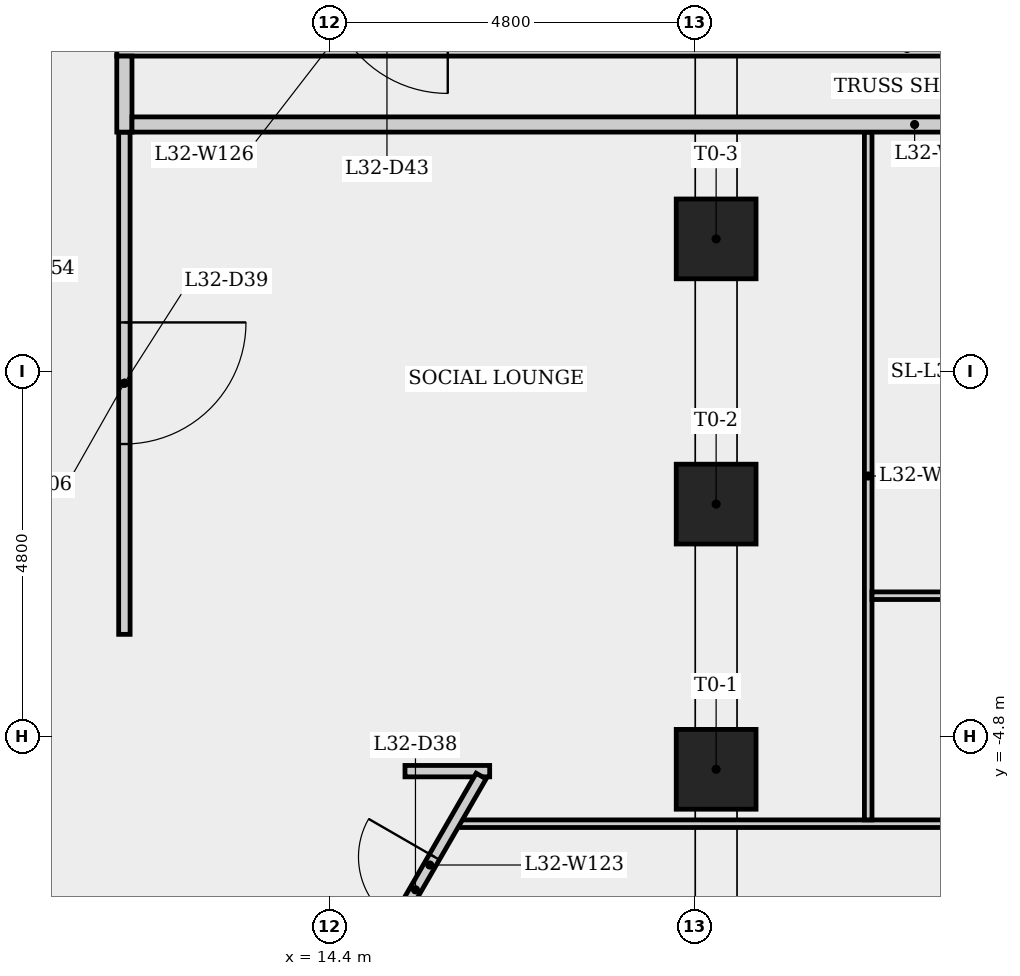
"""IFC4 building model, lengths in metres.
Left out: names, types, materials, properties, quantities, classifications, styles, units other than length and angle.
Written with IfcOpenShell. Run it as: python <this file> out.ifc"""

import sys

from ifc_helpers import new_model, si_unit, direction, frame, frame_2d, origin, origin_2d, place, context, subcontext, project, spatial, rectangle, extrude, element, fill, save


model = new_model("IFC4")
c1 = context("Model", 3, precision=1e-05, world=origin(), true_north=direction((0.0, 1.0)))
c2 = subcontext(c1, "Body", "Model", "MODEL_VIEW")
j1 = project(units=[si_unit("LENGTHUNIT", "METRE"), si_unit("PLANEANGLEUNIT", "RADIAN")], contexts=[c1])
p1 = place(None, origin())
s1 = spatial("IfcSite", under=j1, at=p1, CompositionType="ELEMENT")
p2 = place(p1, origin())
s2 = spatial("IfcBuilding", under=s1, at=p2, CompositionType="ELEMENT")
p3 = place(p2, frame((0.0, 0.0, 120.5)))
s3 = spatial("IfcBuildingStorey", under=s2, at=p3, CompositionType="ELEMENT", Elevation=120.5)
for number, where, z_axis, x_axis in (
    (1, (19.486, -5.234, 0.0), (0.0, 0.0, 1.0), (1.0, 0.0, 0.0)),
    (2, (19.486, -1.745, 0.0), (0.0, 0.0, 1.0), (1.0, 0.0, 0.0)),
    (3, (19.486, 1.745, 0.0), (0.0, 0.0, 1.0), (1.0, 0.0, 0.0)),
):
    element("IfcColumn", number, at=place(p3, frame(where, z_axis=z_axis, x_axis=x_axis)), inside=s3, PredefinedType="COLUMN", context=c2, shape_type="SweptSolid", body=[
        extrude(rectangle(XDim=1.05, YDim=1.05, at=origin_2d()), origin(), (0.0, 0.0, 1.0), 4.0),
    ])
p4 = place(p3, frame((11.7, 3.15, 0.0), z_axis=(0.0, 0.0, 1.0), x_axis=(0.0, -1.0, 0.0)))
e4 = element("IfcWall", 4, at=p4, inside=s3, PredefinedType="PARTITIONING", context=c2, shape_type="SweptSolid", body=[
    extrude(rectangle(XDim=6.609, YDim=0.15, at=frame_2d((3.304, 0.0))), origin(), (0.0, 0.0, 1.0), 3.6),
])
p5 = place(p4, frame((2.504, 0.0, 0.0)))
e5 = element("IfcOpeningElement", 5, at=p5, cuts=e4, PredefinedType="OPENING", context=c2, shape_type="SweptSolid", body=[
    extrude(rectangle(XDim=1.6, YDim=2.1, at=frame_2d((0.8, 1.05))), frame((0.0, 0.085, 0.0), z_axis=(0.0, -1.0, 0.0), x_axis=(1.0, 0.0, 0.0)), (0.0, 0.0, 1.0), 0.17),
])
p6 = place(p3, frame((11.6, 4.25, 0.0), z_axis=(0.0, 0.0, 1.0), x_axis=(1.0, 0.0, 0.0)))
e6 = element("IfcWall", 6, at=p6, inside=s3, PredefinedType="PLUMBINGWALL", context=c2, shape_type="SweptSolid", body=[
    extrude(rectangle(XDim=20.794, YDim=0.2, at=frame_2d((10.397, 0.0))), origin(), (0.0, 0.0, 1.0), 3.6),
])
p7 = place(p3, frame((11.7, 4.15, 0.0), z_axis=(0.0, 0.0, 1.0), x_axis=(0.0, -1.0, 0.0)))
e7 = element("IfcWall", 7, at=p7, inside=s3, PredefinedType="PLUMBINGWALL", context=c2, shape_type="SweptSolid", body=[
    extrude(rectangle(XDim=1.0, YDim=0.2, at=frame_2d((0.5, 0.0))), origin(), (0.0, 0.0, 1.0), 3.6),
])
p8 = place(p3, frame((15.392, -5.259, 0.0), z_axis=(0.0, 0.0, 1.0), x_axis=(1.0, 0.0, 0.0)))
e8 = element("IfcWall", 8, at=p8, inside=s3, PredefinedType="PARTITIONING", context=c2, shape_type="SweptSolid", body=[
    extrude(rectangle(XDim=1.114, YDim=0.15, at=frame_2d((0.557, 0.0))), origin(), (0.0, 0.0, 1.0), 3.6),
])
p9 = place(p3, frame((16.107, -5.95, 0.0), z_axis=(0.0, 0.0, 1.0), x_axis=(1.0, 0.0, 0.0)))
e9 = element("IfcWall", 9, at=p9, inside=s3, PredefinedType="PARTITIONING", context=c2, shape_type="SweptSolid", body=[
    extrude(rectangle(XDim=16.137, YDim=0.1, at=frame_2d((8.069, 0.0))), origin(), (0.0, 0.0, 1.0), 3.6),
])
p10 = place(p9, frame((6.529, 0.0, 0.0)))
e10 = element("IfcOpeningElement", 10, at=p10, cuts=e9, PredefinedType="OPENING", context=c2, shape_type="SweptSolid", body=[
    extrude(rectangle(XDim=0.9, YDim=2.1, at=frame_2d((0.45, 1.05))), frame((0.0, 0.06, 0.0), z_axis=(0.0, -1.0, 0.0), x_axis=(1.0, 0.0, 0.0)), (0.0, 0.0, 1.0), 0.12),
])
p11 = place(p9, frame((9.829, 0.0, 0.0)))
e11 = element("IfcOpeningElement", 11, at=p11, cuts=e9, PredefinedType="OPENING", context=c2, shape_type="SweptSolid", body=[
    extrude(rectangle(XDim=0.9, YDim=2.1, at=frame_2d((0.45, 1.05))), frame((0.0, 0.06, 0.0), z_axis=(0.0, -1.0, 0.0), x_axis=(1.0, 0.0, 0.0)), (0.0, 0.0, 1.0), 0.12),
])
p12 = place(p3, frame((15.042, -7.664, 0.0), z_axis=(0.0, 0.0, 1.0), x_axis=(0.500006618465, 0.866021582578, 0.0)))
e12 = element("IfcWall", 12, at=p12, inside=s3, PredefinedType="PARTITIONING", context=c2, shape_type="SweptSolid", body=[
    extrude(rectangle(XDim=2.702, YDim=0.15, at=frame_2d((1.351, 0.0))), origin(), (0.0, 0.0, 1.0), 3.6),
])
p13 = place(p12, frame((0.474, 0.0, 0.0)))
e13 = element("IfcOpeningElement", 13, at=p13, cuts=e12, PredefinedType="OPENING", context=c2, shape_type="SweptSolid", body=[
    extrude(rectangle(XDim=1.0, YDim=2.1, at=frame_2d((0.5, 1.05))), frame((0.0, 0.085, 0.0), z_axis=(0.0, -1.0, 0.0), x_axis=(1.0, 0.0, 0.0)), (0.0, 0.0, 1.0), 0.17),
])
p14 = place(p3, frame((21.486, -5.9, 0.0), z_axis=(0.0, 0.0, 1.0), x_axis=(0.0, 1.0, 0.0)))
e14 = element("IfcWall", 14, at=p14, inside=s3, PredefinedType="PARTITIONING", context=c2, shape_type="SweptSolid", body=[
    extrude(rectangle(XDim=9.05, YDim=0.1, at=frame_2d((4.525, 0.0))), origin(), (0.0, 0.0, 1.0), 3.6),
])
p15 = place(p3, frame((11.8, 3.25, 0.0), z_axis=(0.0, 0.0, 1.0), x_axis=(1.0, 0.0, 0.0)))
e15 = element("IfcWall", 15, at=p15, inside=s3, PredefinedType="PLUMBINGWALL", context=c2, shape_type="SweptSolid", body=[
    extrude(rectangle(XDim=20.594, YDim=0.2, at=frame_2d((10.297, 0.0))), origin(), (0.0, 0.0, 1.0), 3.6),
])
p16 = place(p3, frame((21.536, -2.95, 0.0), z_axis=(0.0, 0.0, 1.0), x_axis=(1.0, 0.0, 0.0)))
e16 = element("IfcWall", 16, at=p16, inside=s3, PredefinedType="PARTITIONING", context=c2, shape_type="SweptSolid", body=[
    extrude(rectangle(XDim=6.6, YDim=0.1, at=frame_2d((3.3, 0.0))), origin(), (0.0, 0.0, 1.0), 3.6),
])
p17 = place(p13, origin())
e17 = element("IfcDoor", 17, at=p17, inside=s3, OperationType="SINGLE_SWING_RIGHT", PredefinedType="DOOR", context=c2, shape_type="SweptSolid", body=[
    extrude(rectangle(XDim=1.0, YDim=2.1, at=frame_2d((0.5, 1.05))), frame((0.0, 0.025, 0.0), z_axis=(0.0, -1.0, 0.0), x_axis=(1.0, 0.0, 0.0)), (0.0, 0.0, 1.0), 0.05),
])
fill(e13, e17)
p18 = place(p5, origin())
e18 = element("IfcDoor", 18, at=p18, inside=s3, OperationType="SINGLE_SWING_LEFT", PredefinedType="DOOR", context=c2, shape_type="SweptSolid", body=[
    extrude(rectangle(XDim=1.6, YDim=2.1, at=frame_2d((0.8, 1.05))), frame((0.0, 0.025, 0.0), z_axis=(0.0, -1.0, 0.0), x_axis=(1.0, 0.0, 0.0)), (0.0, 0.0, 1.0), 0.05),
])
fill(e5, e18)
save(model, sys.argv[1])
